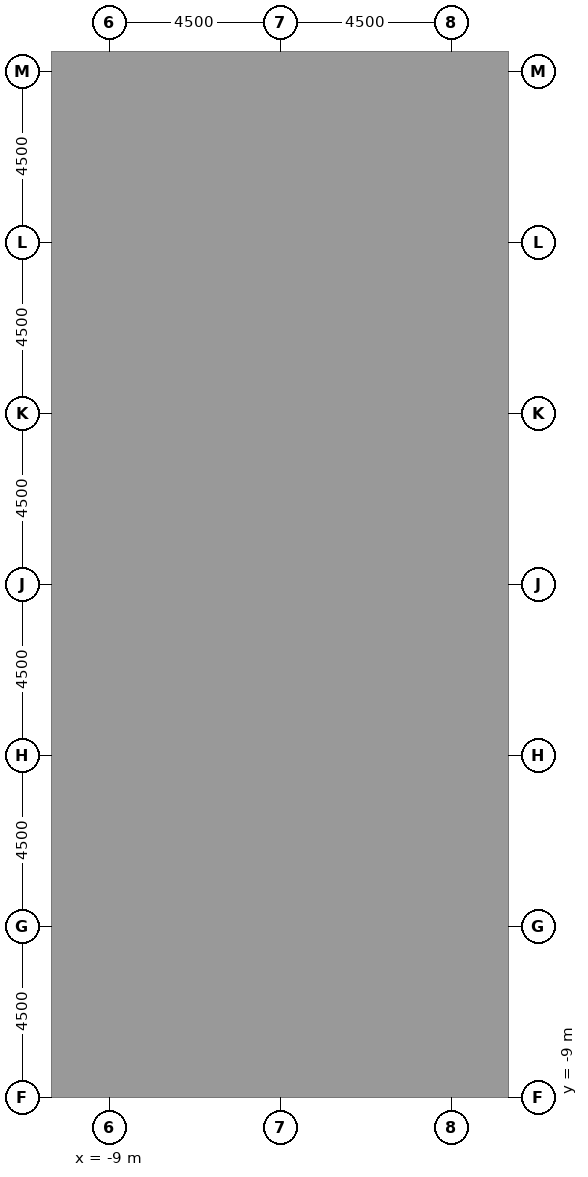
"""IFC4 building model, lengths in metres.
Left out: names, types, materials, properties, quantities, classifications, styles, units other than length and angle.
Written with IfcOpenShell. Run it as: python <this file> out.ifc"""

import sys

from ifc_helpers import new_model, si_unit, direction, frame, frame_2d, origin, place, context, subcontext, project, spatial, rectangle, extrude, element, fill, save


model = new_model("IFC4")
c1 = context("Model", 3, precision=1e-05, world=origin(), true_north=direction((0.0, 1.0)))
c2 = subcontext(c1, "Body", "Model", "MODEL_VIEW")
j1 = project(units=[si_unit("LENGTHUNIT", "METRE"), si_unit("PLANEANGLEUNIT", "RADIAN")], contexts=[c1])
p1 = place(None, origin())
s1 = spatial("IfcSite", under=j1, at=p1, CompositionType="ELEMENT")
p2 = place(p1, origin())
s2 = spatial("IfcBuilding", under=s1, at=p2, CompositionType="ELEMENT")
p3 = place(p2, frame((0.0, 0.0, 7.2)))
s3 = spatial("IfcBuildingStorey", under=s2, at=p3, CompositionType="ELEMENT", Elevation=7.2)
p4 = place(p3, frame((-10.0, -9.0, 0.0), z_axis=(0.0, 0.0, 1.0), x_axis=(0.0, 1.0, 0.0)))
e1 = element("IfcWall", 1, at=p4, inside=s3, PredefinedType="SHEAR", context=c2, shape_type="SweptSolid", body=[
    extrude(rectangle(XDim=27.5, YDim=1.0, at=frame_2d((13.75, 0.0))), origin(), (0.0, 0.0, 1.0), 4.1),
])
p5 = place(p4, frame((12.55, 0.0, 0.0)))
e2 = element("IfcOpeningElement", 2, at=p5, cuts=e1, PredefinedType="OPENING", context=c2, shape_type="SweptSolid", body=[
    extrude(rectangle(XDim=2.4, YDim=2.4, at=frame_2d((1.2, 1.2))), frame((0.0, 0.51, 0.0), z_axis=(0.0, -1.0, 0.0), x_axis=(1.0, 0.0, 0.0)), (0.0, 0.0, 1.0), 1.02),
])
p6 = place(p4, frame((6.825, 0.0, 0.0)))
e3 = element("IfcOpeningElement", 3, at=p6, cuts=e1, PredefinedType="OPENING", context=c2, shape_type="SweptSolid", body=[
    extrude(rectangle(XDim=1.2, YDim=2.1, at=frame_2d((0.6, 1.05))), frame((0.0, 0.51, 0.0), z_axis=(0.0, -1.0, 0.0), x_axis=(1.0, 0.0, 0.0)), (0.0, 0.0, 1.0), 1.02),
])
p7 = place(p4, frame((19.475, 0.0, 0.0)))
e4 = element("IfcOpeningElement", 4, at=p7, cuts=e1, PredefinedType="OPENING", context=c2, shape_type="SweptSolid", body=[
    extrude(rectangle(XDim=1.2, YDim=2.1, at=frame_2d((0.6, 1.05))), frame((0.0, 0.51, 0.0), z_axis=(0.0, -1.0, 0.0), x_axis=(1.0, 0.0, 0.0)), (0.0, 0.0, 1.0), 1.02),
])
p8 = place(p3, frame((1.0, -9.0, 0.0), z_axis=(0.0, 0.0, 1.0), x_axis=(0.0, 1.0, 0.0)))
e5 = element("IfcWall", 5, at=p8, inside=s3, PredefinedType="SHEAR", context=c2, shape_type="SweptSolid", body=[
    extrude(rectangle(XDim=27.5, YDim=1.0, at=frame_2d((13.75, 0.0))), origin(), (0.0, 0.0, 1.0), 4.1),
])
p9 = place(p8, frame((12.55, 0.0, 0.0)))
e6 = element("IfcOpeningElement", 6, at=p9, cuts=e5, PredefinedType="OPENING", context=c2, shape_type="SweptSolid", body=[
    extrude(rectangle(XDim=2.4, YDim=2.4, at=frame_2d((1.2, 1.2))), frame((0.0, 0.51, 0.0), z_axis=(0.0, -1.0, 0.0), x_axis=(1.0, 0.0, 0.0)), (0.0, 0.0, 1.0), 1.02),
])
p10 = place(p8, frame((4.025, 0.0, 0.0)))
e7 = element("IfcOpeningElement", 7, at=p10, cuts=e5, PredefinedType="OPENING", context=c2, shape_type="SweptSolid", body=[
    extrude(rectangle(XDim=1.2, YDim=2.1, at=frame_2d((0.6, 1.05))), frame((0.0, 0.51, 0.0), z_axis=(0.0, -1.0, 0.0), x_axis=(1.0, 0.0, 0.0)), (0.0, 0.0, 1.0), 1.02),
])
p11 = place(p8, frame((22.275, 0.0, 0.0)))
e8 = element("IfcOpeningElement", 8, at=p11, cuts=e5, PredefinedType="OPENING", context=c2, shape_type="SweptSolid", body=[
    extrude(rectangle(XDim=1.2, YDim=2.1, at=frame_2d((0.6, 1.05))), frame((0.0, 0.51, 0.0), z_axis=(0.0, -1.0, 0.0), x_axis=(1.0, 0.0, 0.0)), (0.0, 0.0, 1.0), 1.02),
])
for number, where, z_axis, x_axis in (
    (9, (-9.5, -8.5, 0.0), (0.0, 0.0, 1.0), (1.0, 0.0, 0.0)),
    (10, (-9.5, 18.0, 0.0), (0.0, 0.0, 1.0), (1.0, 0.0, 0.0)),
):
    element("IfcWall", number, at=place(p3, frame(where, z_axis=z_axis, x_axis=x_axis)), inside=s3, PredefinedType="SHEAR", context=c2, shape_type="SweptSolid", body=[
        extrude(rectangle(XDim=10.0, YDim=1.0, at=frame_2d((5.0, 0.0))), origin(), (0.0, 0.0, 1.0), 4.1),
    ])
p12 = place(p3, frame((-9.5, -0.5, 0.0), z_axis=(0.0, 0.0, 1.0), x_axis=(1.0, 0.0, 0.0)))
e11 = element("IfcWall", 11, at=p12, inside=s3, PredefinedType="SHEAR", context=c2, shape_type="SweptSolid", body=[
    extrude(rectangle(XDim=10.0, YDim=0.5, at=frame_2d((5.0, 0.0))), origin(), (0.0, 0.0, 1.0), 4.1),
])
p13 = place(p3, frame((-9.5, 2.8, 0.0), z_axis=(0.0, 0.0, 1.0), x_axis=(1.0, 0.0, 0.0)))
e12 = element("IfcWall", 12, at=p13, inside=s3, PredefinedType="SHEAR", context=c2, shape_type="SweptSolid", body=[
    extrude(rectangle(XDim=10.0, YDim=0.5, at=frame_2d((5.0, 0.0))), origin(), (0.0, 0.0, 1.0), 4.1),
])
p14 = place(p13, frame((0.512, 0.0, 0.0)))
e13 = element("IfcOpeningElement", 13, at=p14, cuts=e12, PredefinedType="OPENING", context=c2, shape_type="SweptSolid", body=[
    extrude(rectangle(XDim=1.1, YDim=2.1, at=frame_2d((0.55, 1.05))), frame((0.0, 0.26, 0.0), z_axis=(0.0, -1.0, 0.0), x_axis=(1.0, 0.0, 0.0)), (0.0, 0.0, 1.0), 0.52),
])
p15 = place(p13, frame((3.137, 0.0, 0.0)))
e14 = element("IfcOpeningElement", 14, at=p15, cuts=e12, PredefinedType="OPENING", context=c2, shape_type="SweptSolid", body=[
    extrude(rectangle(XDim=1.1, YDim=2.1, at=frame_2d((0.55, 1.05))), frame((0.0, 0.26, 0.0), z_axis=(0.0, -1.0, 0.0), x_axis=(1.0, 0.0, 0.0)), (0.0, 0.0, 1.0), 0.52),
])
p16 = place(p13, frame((8.387, 0.0, 0.0)))
e15 = element("IfcOpeningElement", 15, at=p16, cuts=e12, PredefinedType="OPENING", context=c2, shape_type="SweptSolid", body=[
    extrude(rectangle(XDim=1.1, YDim=2.1, at=frame_2d((0.55, 1.05))), frame((0.0, 0.26, 0.0), z_axis=(0.0, -1.0, 0.0), x_axis=(1.0, 0.0, 0.0)), (0.0, 0.0, 1.0), 0.52),
])
p17 = place(p3, frame((-9.5, 6.7, 0.0), z_axis=(0.0, 0.0, 1.0), x_axis=(1.0, 0.0, 0.0)))
e16 = element("IfcWall", 16, at=p17, inside=s3, PredefinedType="SHEAR", context=c2, shape_type="SweptSolid", body=[
    extrude(rectangle(XDim=10.0, YDim=0.5, at=frame_2d((5.0, 0.0))), origin(), (0.0, 0.0, 1.0), 4.1),
])
p18 = place(p17, frame((0.512, 0.0, 0.0)))
e17 = element("IfcOpeningElement", 17, at=p18, cuts=e16, PredefinedType="OPENING", context=c2, shape_type="SweptSolid", body=[
    extrude(rectangle(XDim=1.1, YDim=2.1, at=frame_2d((0.55, 1.05))), frame((0.0, 0.26, 0.0), z_axis=(0.0, -1.0, 0.0), x_axis=(1.0, 0.0, 0.0)), (0.0, 0.0, 1.0), 0.52),
])
p19 = place(p17, frame((3.188, 0.0, 0.0)))
e18 = element("IfcOpeningElement", 18, at=p19, cuts=e16, PredefinedType="OPENING", context=c2, shape_type="SweptSolid", body=[
    extrude(rectangle(XDim=1.0, YDim=2.1, at=frame_2d((0.5, 1.05))), frame((0.0, 0.26, 0.0), z_axis=(0.0, -1.0, 0.0), x_axis=(1.0, 0.0, 0.0)), (0.0, 0.0, 1.0), 0.52),
])
p20 = place(p17, frame((5.812, 0.0, 0.0)))
e19 = element("IfcOpeningElement", 19, at=p20, cuts=e16, PredefinedType="OPENING", context=c2, shape_type="SweptSolid", body=[
    extrude(rectangle(XDim=1.0, YDim=2.1, at=frame_2d((0.5, 1.05))), frame((0.0, 0.26, 0.0), z_axis=(0.0, -1.0, 0.0), x_axis=(1.0, 0.0, 0.0)), (0.0, 0.0, 1.0), 0.52),
])
p21 = place(p17, frame((8.438, 0.0, 0.0)))
e20 = element("IfcOpeningElement", 20, at=p21, cuts=e16, PredefinedType="OPENING", context=c2, shape_type="SweptSolid", body=[
    extrude(rectangle(XDim=1.0, YDim=2.1, at=frame_2d((0.5, 1.05))), frame((0.0, 0.26, 0.0), z_axis=(0.0, -1.0, 0.0), x_axis=(1.0, 0.0, 0.0)), (0.0, 0.0, 1.0), 0.52),
])
p22 = place(p3, frame((-9.5, 10.0, 0.0), z_axis=(0.0, 0.0, 1.0), x_axis=(1.0, 0.0, 0.0)))
e21 = element("IfcWall", 21, at=p22, inside=s3, PredefinedType="SHEAR", context=c2, shape_type="SweptSolid", body=[
    extrude(rectangle(XDim=10.0, YDim=0.5, at=frame_2d((5.0, 0.0))), origin(), (0.0, 0.0, 1.0), 4.1),
])
for number, where, z_axis, x_axis in (
    (22, (-7.125, -0.25, 0.0), (0.0, 0.0, 1.0), (0.0, 1.0, 0.0)),
    (23, (-7.125, 6.95, 0.0), (0.0, 0.0, 1.0), (0.0, 1.0, 0.0)),
    (24, (-4.5, -0.25, 0.0), (0.0, 0.0, 1.0), (0.0, 1.0, 0.0)),
    (25, (-4.5, 6.95, 0.0), (0.0, 0.0, 1.0), (0.0, 1.0, 0.0)),
    (26, (-1.875, -0.25, 0.0), (0.0, 0.0, 1.0), (0.0, 1.0, 0.0)),
    (27, (-1.875, 6.95, 0.0), (0.0, 0.0, 1.0), (0.0, 1.0, 0.0)),
):
    element("IfcWall", number, at=place(p3, frame(where, z_axis=z_axis, x_axis=x_axis)), inside=s3, PredefinedType="SHEAR", context=c2, shape_type="SweptSolid", body=[
        extrude(rectangle(XDim=2.8, YDim=0.5, at=frame_2d((1.4, 0.0))), origin(), (0.0, 0.0, 1.0), 4.1),
    ])
for number, where, z_axis, x_axis in (
    (28, (-4.5, -8.0, 0.0), (0.0, 0.0, 1.0), (0.0, 1.0, 0.0)),
    (29, (-4.5, 10.25, 0.0), (0.0, 0.0, 1.0), (0.0, 1.0, 0.0)),
):
    element("IfcWall", number, at=place(p3, frame(where, z_axis=z_axis, x_axis=x_axis)), inside=s3, PredefinedType="SHEAR", context=c2, shape_type="SweptSolid", body=[
        extrude(rectangle(XDim=7.25, YDim=0.5, at=frame_2d((3.625, 0.0))), origin(), (0.0, 0.0, 1.0), 4.1),
    ])
p23 = place(p3, frame((-1.0, -8.0, 0.0), z_axis=(0.0, 0.0, 1.0), x_axis=(0.0, 1.0, 0.0)))
e30 = element("IfcWall", 30, at=p23, inside=s3, PredefinedType="PARTITIONING", context=c2, shape_type="SweptSolid", body=[
    extrude(rectangle(XDim=2.465, YDim=0.1, at=frame_2d((1.232, 0.0))), origin(), (0.0, 0.0, 1.0), 3.65),
])
p24 = place(p23, frame((0.732, 0.0, 0.0)))
e31 = element("IfcOpeningElement", 31, at=p24, cuts=e30, PredefinedType="OPENING", context=c2, shape_type="SweptSolid", body=[
    extrude(rectangle(XDim=1.0, YDim=2.1, at=frame_2d((0.5, 1.05))), frame((0.0, 0.06, 0.0), z_axis=(0.0, -1.0, 0.0), x_axis=(1.0, 0.0, 0.0)), (0.0, 0.0, 1.0), 0.12),
])
p25 = place(p3, frame((-1.0, -5.535, 0.0), z_axis=(0.0, 0.0, 1.0), x_axis=(0.0, 1.0, 0.0)))
e32 = element("IfcWall", 32, at=p25, inside=s3, PredefinedType="PARTITIONING", context=c2, shape_type="SweptSolid", body=[
    extrude(rectangle(XDim=2.03, YDim=0.1, at=frame_2d((1.015, 0.0))), origin(), (0.0, 0.0, 1.0), 3.65),
])
p26 = place(p25, frame((0.515, 0.0, 0.0)))
e33 = element("IfcOpeningElement", 33, at=p26, cuts=e32, PredefinedType="OPENING", context=c2, shape_type="SweptSolid", body=[
    extrude(rectangle(XDim=1.0, YDim=2.1, at=frame_2d((0.5, 1.05))), frame((0.0, 0.06, 0.0), z_axis=(0.0, -1.0, 0.0), x_axis=(1.0, 0.0, 0.0)), (0.0, 0.0, 1.0), 0.12),
])
p27 = place(p3, frame((-1.0, -3.505, 0.0), z_axis=(0.0, 0.0, 1.0), x_axis=(0.0, 1.0, 0.0)))
e34 = element("IfcWall", 34, at=p27, inside=s3, PredefinedType="PARTITIONING", context=c2, shape_type="SweptSolid", body=[
    extrude(rectangle(XDim=2.755, YDim=0.1, at=frame_2d((1.377, 0.0))), origin(), (0.0, 0.0, 1.0), 3.65),
])
p28 = place(p27, frame((0.877, 0.0, 0.0)))
e35 = element("IfcOpeningElement", 35, at=p28, cuts=e34, PredefinedType="OPENING", context=c2, shape_type="SweptSolid", body=[
    extrude(rectangle(XDim=1.0, YDim=2.1, at=frame_2d((0.5, 1.05))), frame((0.0, 0.06, 0.0), z_axis=(0.0, -1.0, 0.0), x_axis=(1.0, 0.0, 0.0)), (0.0, 0.0, 1.0), 0.12),
])
for number, where, z_axis, x_axis in (
    (36, (-4.25, -5.535, 0.0), (0.0, 0.0, 1.0), (1.0, 0.0, 0.0)),
    (37, (-4.25, -3.505, 0.0), (0.0, 0.0, 1.0), (1.0, 0.0, 0.0)),
):
    element("IfcWall", number, at=place(p3, frame(where, z_axis=z_axis, x_axis=x_axis)), inside=s3, PredefinedType="PARTITIONING", context=c2, shape_type="SweptSolid", body=[
        extrude(rectangle(XDim=3.25, YDim=0.1, at=frame_2d((1.625, 0.0))), origin(), (0.0, 0.0, 1.0), 3.65),
    ])
p29 = place(p3, frame((-0.9, 10.25, 0.0), z_axis=(0.0, 0.0, 1.0), x_axis=(0.0, 1.0, 0.0)))
e38 = element("IfcWall", 38, at=p29, inside=s3, PredefinedType="PARTITIONING", context=c2, shape_type="SweptSolid", body=[
    extrude(rectangle(XDim=2.175, YDim=0.1, at=frame_2d((1.087, 0.0))), origin(), (0.0, 0.0, 1.0), 3.65),
])
p30 = place(p29, frame((0.587, 0.0, 0.0)))
e39 = element("IfcOpeningElement", 39, at=p30, cuts=e38, PredefinedType="OPENING", context=c2, shape_type="SweptSolid", body=[
    extrude(rectangle(XDim=1.0, YDim=2.1, at=frame_2d((0.5, 1.05))), frame((0.0, 0.06, 0.0), z_axis=(0.0, -1.0, 0.0), x_axis=(1.0, 0.0, 0.0)), (0.0, 0.0, 1.0), 0.12),
])
p31 = place(p3, frame((-0.9, 12.425, 0.0), z_axis=(0.0, 0.0, 1.0), x_axis=(0.0, 1.0, 0.0)))
e40 = element("IfcWall", 40, at=p31, inside=s3, PredefinedType="PARTITIONING", context=c2, shape_type="SweptSolid", body=[
    extrude(rectangle(XDim=2.32, YDim=0.1, at=frame_2d((1.16, 0.0))), origin(), (0.0, 0.0, 1.0), 3.65),
])
p32 = place(p31, frame((0.66, 0.0, 0.0)))
e41 = element("IfcOpeningElement", 41, at=p32, cuts=e40, PredefinedType="OPENING", context=c2, shape_type="SweptSolid", body=[
    extrude(rectangle(XDim=1.0, YDim=2.1, at=frame_2d((0.5, 1.05))), frame((0.0, 0.06, 0.0), z_axis=(0.0, -1.0, 0.0), x_axis=(1.0, 0.0, 0.0)), (0.0, 0.0, 1.0), 0.12),
])
p33 = place(p3, frame((-0.9, 14.745, 0.0), z_axis=(0.0, 0.0, 1.0), x_axis=(0.0, 1.0, 0.0)))
e42 = element("IfcWall", 42, at=p33, inside=s3, PredefinedType="PARTITIONING", context=c2, shape_type="SweptSolid", body=[
    extrude(rectangle(XDim=2.755, YDim=0.1, at=frame_2d((1.377, 0.0))), origin(), (0.0, 0.0, 1.0), 3.65),
])
p34 = place(p33, frame((0.877, 0.0, 0.0)))
e43 = element("IfcOpeningElement", 43, at=p34, cuts=e42, PredefinedType="OPENING", context=c2, shape_type="SweptSolid", body=[
    extrude(rectangle(XDim=1.0, YDim=2.1, at=frame_2d((0.5, 1.05))), frame((0.0, 0.06, 0.0), z_axis=(0.0, -1.0, 0.0), x_axis=(1.0, 0.0, 0.0)), (0.0, 0.0, 1.0), 0.12),
])
for number, where, z_axis, x_axis in (
    (44, (-4.25, 12.425, 0.0), (0.0, 0.0, 1.0), (1.0, 0.0, 0.0)),
    (45, (-4.25, 14.745, 0.0), (0.0, 0.0, 1.0), (1.0, 0.0, 0.0)),
):
    element("IfcWall", number, at=place(p3, frame(where, z_axis=z_axis, x_axis=x_axis)), inside=s3, PredefinedType="PARTITIONING", context=c2, shape_type="SweptSolid", body=[
        extrude(rectangle(XDim=3.35, YDim=0.1, at=frame_2d((1.675, 0.0))), origin(), (0.0, 0.0, 1.0), 3.65),
    ])
p35 = place(p14, origin())
e46 = element("IfcDoor", 46, at=p35, inside=s3, OperationType="DOUBLE_DOOR_SLIDING", PredefinedType="DOOR", context=c2, shape_type="SweptSolid", body=[
    extrude(rectangle(XDim=1.1, YDim=2.1, at=frame_2d((0.55, 1.05))), frame((0.0, 0.025, 0.0), z_axis=(0.0, -1.0, 0.0), x_axis=(1.0, 0.0, 0.0)), (0.0, 0.0, 1.0), 0.05),
])
fill(e13, e46)
p36 = place(p15, origin())
e47 = element("IfcDoor", 47, at=p36, inside=s3, OperationType="DOUBLE_DOOR_SLIDING", PredefinedType="DOOR", context=c2, shape_type="SweptSolid", body=[
    extrude(rectangle(XDim=1.1, YDim=2.1, at=frame_2d((0.55, 1.05))), frame((0.0, 0.025, 0.0), z_axis=(0.0, -1.0, 0.0), x_axis=(1.0, 0.0, 0.0)), (0.0, 0.0, 1.0), 0.05),
])
fill(e14, e47)
p37 = place(p16, origin())
e48 = element("IfcDoor", 48, at=p37, inside=s3, OperationType="DOUBLE_DOOR_SLIDING", PredefinedType="DOOR", context=c2, shape_type="SweptSolid", body=[
    extrude(rectangle(XDim=1.1, YDim=2.1, at=frame_2d((0.55, 1.05))), frame((0.0, 0.025, 0.0), z_axis=(0.0, -1.0, 0.0), x_axis=(1.0, 0.0, 0.0)), (0.0, 0.0, 1.0), 0.05),
])
fill(e15, e48)
p38 = place(p18, origin())
e49 = element("IfcDoor", 49, at=p38, inside=s3, OperationType="DOUBLE_DOOR_SLIDING", PredefinedType="DOOR", context=c2, shape_type="SweptSolid", body=[
    extrude(rectangle(XDim=1.1, YDim=2.1, at=frame_2d((0.55, 1.05))), frame((0.0, 0.025, 0.0), z_axis=(0.0, -1.0, 0.0), x_axis=(1.0, 0.0, 0.0)), (0.0, 0.0, 1.0), 0.05),
])
fill(e17, e49)
p39 = place(p5, origin())
e50 = element("IfcDoor", 50, at=p39, inside=s3, OperationType="DOUBLE_DOOR_DOUBLE_SWING", PredefinedType="DOOR", context=c2, shape_type="SweptSolid", body=[
    extrude(rectangle(XDim=2.4, YDim=2.4, at=frame_2d((1.2, 1.2))), frame((0.0, 0.025, 0.0), z_axis=(0.0, -1.0, 0.0), x_axis=(1.0, 0.0, 0.0)), (0.0, 0.0, 1.0), 0.05),
])
fill(e2, e50)
p40 = place(p9, origin())
e51 = element("IfcDoor", 51, at=p40, inside=s3, OperationType="DOUBLE_DOOR_DOUBLE_SWING", PredefinedType="DOOR", context=c2, shape_type="SweptSolid", body=[
    extrude(rectangle(XDim=2.4, YDim=2.4, at=frame_2d((1.2, 1.2))), frame((0.0, 0.025, 0.0), z_axis=(0.0, -1.0, 0.0), x_axis=(1.0, 0.0, 0.0)), (0.0, 0.0, 1.0), 0.05),
])
fill(e6, e51)
p41 = place(p6, origin())
e52 = element("IfcDoor", 52, at=p41, inside=s3, OperationType="SINGLE_SWING_LEFT", PredefinedType="DOOR", context=c2, shape_type="SweptSolid", body=[
    extrude(rectangle(XDim=1.2, YDim=2.1, at=frame_2d((0.6, 1.05))), frame((0.0, 0.025, 0.0), z_axis=(0.0, -1.0, 0.0), x_axis=(1.0, 0.0, 0.0)), (0.0, 0.0, 1.0), 0.05),
])
fill(e3, e52)
p42 = place(p7, origin())
e53 = element("IfcDoor", 53, at=p42, inside=s3, OperationType="SINGLE_SWING_LEFT", PredefinedType="DOOR", context=c2, shape_type="SweptSolid", body=[
    extrude(rectangle(XDim=1.2, YDim=2.1, at=frame_2d((0.6, 1.05))), frame((0.0, 0.025, 0.0), z_axis=(0.0, -1.0, 0.0), x_axis=(1.0, 0.0, 0.0)), (0.0, 0.0, 1.0), 0.05),
])
fill(e4, e53)
p43 = place(p19, origin())
e54 = element("IfcDoor", 54, at=p43, inside=s3, OperationType="SINGLE_SWING_RIGHT", PredefinedType="DOOR", context=c2, shape_type="SweptSolid", body=[
    extrude(rectangle(XDim=1.0, YDim=2.1, at=frame_2d((0.5, 1.05))), frame((0.0, 0.025, 0.0), z_axis=(0.0, -1.0, 0.0), x_axis=(1.0, 0.0, 0.0)), (0.0, 0.0, 1.0), 0.05),
])
fill(e18, e54)
p44 = place(p20, origin())
e55 = element("IfcDoor", 55, at=p44, inside=s3, OperationType="SINGLE_SWING_LEFT", PredefinedType="DOOR", context=c2, shape_type="SweptSolid", body=[
    extrude(rectangle(XDim=1.0, YDim=2.1, at=frame_2d((0.5, 1.05))), frame((0.0, 0.025, 0.0), z_axis=(0.0, -1.0, 0.0), x_axis=(1.0, 0.0, 0.0)), (0.0, 0.0, 1.0), 0.05),
])
fill(e19, e55)
p45 = place(p21, origin())
e56 = element("IfcDoor", 56, at=p45, inside=s3, OperationType="SINGLE_SWING_RIGHT", PredefinedType="DOOR", context=c2, shape_type="SweptSolid", body=[
    extrude(rectangle(XDim=1.0, YDim=2.1, at=frame_2d((0.5, 1.05))), frame((0.0, 0.025, 0.0), z_axis=(0.0, -1.0, 0.0), x_axis=(1.0, 0.0, 0.0)), (0.0, 0.0, 1.0), 0.05),
])
fill(e20, e56)
p46 = place(p10, origin())
e57 = element("IfcDoor", 57, at=p46, inside=s3, OperationType="SINGLE_SWING_LEFT", PredefinedType="DOOR", context=c2, shape_type="SweptSolid", body=[
    extrude(rectangle(XDim=1.2, YDim=2.1, at=frame_2d((0.6, 1.05))), frame((0.0, 0.475, 0.0), z_axis=(0.0, -1.0, 0.0), x_axis=(1.0, 0.0, 0.0)), (0.0, 0.0, 1.0), 0.05),
])
fill(e7, e57)
p47 = place(p24, origin())
e58 = element("IfcDoor", 58, at=p47, inside=s3, OperationType="SINGLE_SWING_RIGHT", PredefinedType="DOOR", context=c2, shape_type="SweptSolid", body=[
    extrude(rectangle(XDim=1.0, YDim=2.1, at=frame_2d((0.5, 1.05))), frame((0.0, 0.025, 0.0), z_axis=(0.0, -1.0, 0.0), x_axis=(1.0, 0.0, 0.0)), (0.0, 0.0, 1.0), 0.05),
])
fill(e31, e58)
p48 = place(p26, origin())
e59 = element("IfcDoor", 59, at=p48, inside=s3, OperationType="SINGLE_SWING_LEFT", PredefinedType="DOOR", context=c2, shape_type="SweptSolid", body=[
    extrude(rectangle(XDim=1.0, YDim=2.1, at=frame_2d((0.5, 1.05))), frame((0.0, 0.025, 0.0), z_axis=(0.0, -1.0, 0.0), x_axis=(1.0, 0.0, 0.0)), (0.0, 0.0, 1.0), 0.05),
])
fill(e33, e59)
p49 = place(p28, origin())
e60 = element("IfcDoor", 60, at=p49, inside=s3, OperationType="SINGLE_SWING_RIGHT", PredefinedType="DOOR", context=c2, shape_type="SweptSolid", body=[
    extrude(rectangle(XDim=1.0, YDim=2.1, at=frame_2d((0.5, 1.05))), frame((0.0, 0.025, 0.0), z_axis=(0.0, -1.0, 0.0), x_axis=(1.0, 0.0, 0.0)), (0.0, 0.0, 1.0), 0.05),
])
fill(e35, e60)
p50 = place(p11, origin())
e61 = element("IfcDoor", 61, at=p50, inside=s3, OperationType="SINGLE_SWING_LEFT", PredefinedType="DOOR", context=c2, shape_type="SweptSolid", body=[
    extrude(rectangle(XDim=1.2, YDim=2.1, at=frame_2d((0.6, 1.05))), frame((0.0, 0.475, 0.0), z_axis=(0.0, -1.0, 0.0), x_axis=(1.0, 0.0, 0.0)), (0.0, 0.0, 1.0), 0.05),
])
fill(e8, e61)
p51 = place(p30, origin())
e62 = element("IfcDoor", 62, at=p51, inside=s3, OperationType="SINGLE_SWING_RIGHT", PredefinedType="DOOR", context=c2, shape_type="SweptSolid", body=[
    extrude(rectangle(XDim=1.0, YDim=2.1, at=frame_2d((0.5, 1.05))), frame((0.0, 0.025, 0.0), z_axis=(0.0, -1.0, 0.0), x_axis=(1.0, 0.0, 0.0)), (0.0, 0.0, 1.0), 0.05),
])
fill(e39, e62)
p52 = place(p32, origin())
e63 = element("IfcDoor", 63, at=p52, inside=s3, OperationType="SINGLE_SWING_LEFT", PredefinedType="DOOR", context=c2, shape_type="SweptSolid", body=[
    extrude(rectangle(XDim=1.0, YDim=2.1, at=frame_2d((0.5, 1.05))), frame((0.0, 0.025, 0.0), z_axis=(0.0, -1.0, 0.0), x_axis=(1.0, 0.0, 0.0)), (0.0, 0.0, 1.0), 0.05),
])
fill(e41, e63)
p53 = place(p34, origin())
e64 = element("IfcDoor", 64, at=p53, inside=s3, OperationType="SINGLE_SWING_RIGHT", PredefinedType="DOOR", context=c2, shape_type="SweptSolid", body=[
    extrude(rectangle(XDim=1.0, YDim=2.1, at=frame_2d((0.5, 1.05))), frame((0.0, 0.025, 0.0), z_axis=(0.0, -1.0, 0.0), x_axis=(1.0, 0.0, 0.0)), (0.0, 0.0, 1.0), 0.05),
])
fill(e43, e64)
save(model, sys.argv[1])
